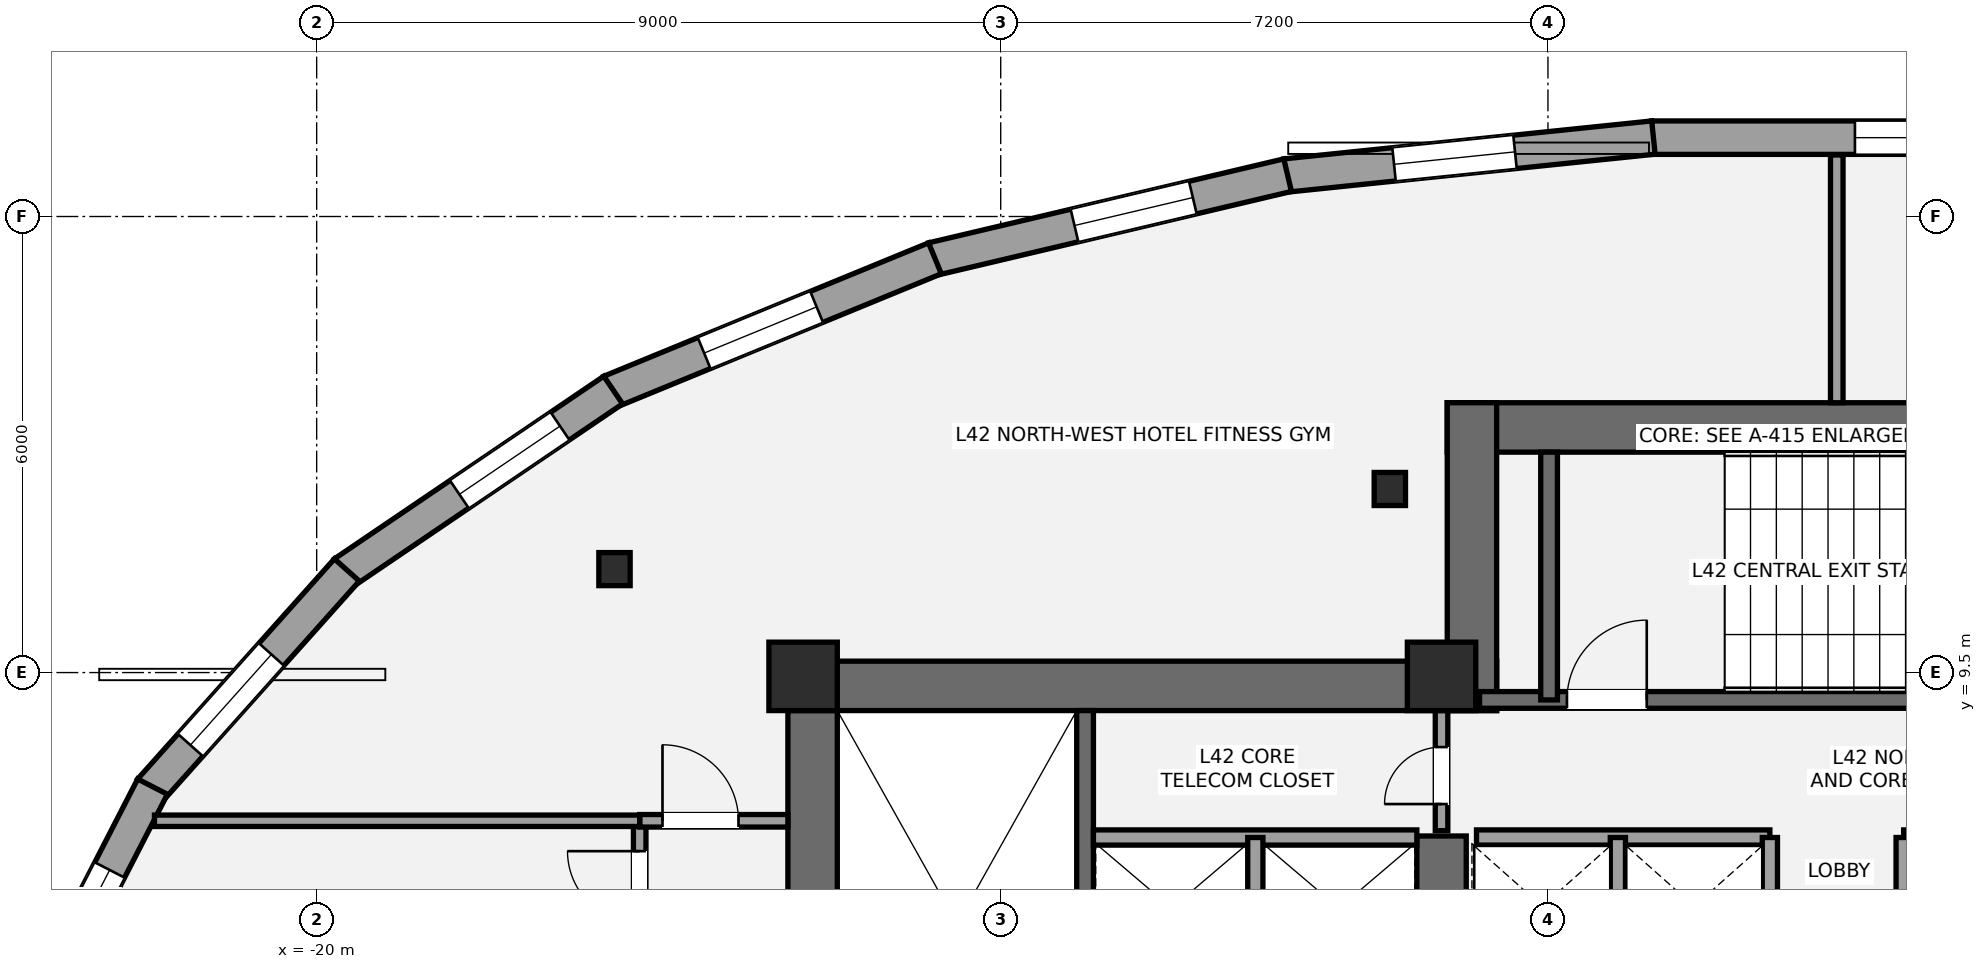
"""IFC4 building model, lengths in metres.
Left out: names, types, materials, properties, quantities, classifications, styles, units other than length and angle.
Written with IfcOpenShell. Run it as: python <this file> out.ifc"""

import sys

from ifc_helpers import new_model, si_unit, direction, frame, frame_2d, origin, origin_2d, place, context, subcontext, project, spatial, rectangle, i_section, extrude, element, fill, save


model = new_model("IFC4")
c1 = context("Model", 3, precision=1e-05, world=origin(), true_north=direction((0.0, 1.0)))
c2 = subcontext(c1, "Body", "Model", "MODEL_VIEW")
j1 = project(units=[si_unit("LENGTHUNIT", "METRE"), si_unit("PLANEANGLEUNIT", "RADIAN")], contexts=[c1])
p1 = place(None, origin())
s1 = spatial("IfcSite", under=j1, at=p1, CompositionType="ELEMENT")
p2 = place(p1, origin())
s2 = spatial("IfcBuilding", under=s1, at=p2, CompositionType="ELEMENT")
p3 = place(p2, frame((0.0, 0.0, 156.6)))
s3 = spatial("IfcBuildingStorey", under=s2, at=p3, CompositionType="ELEMENT", Elevation=156.6)
p4 = place(p3, frame((-13.475, 1.2, 0.0), z_axis=(0.0, 0.0, 1.0), x_axis=(0.0, 1.0, 0.0)))
e1 = element("IfcWall", 1, at=p4, inside=s3, PredefinedType="SHEAR", context=c2, shape_type="SweptSolid", body=[
    extrude(rectangle(XDim=8.45, YDim=0.65, at=frame_2d((4.225, 0.0))), origin(), (0.0, 0.0, 1.0), 3.2),
])
p5 = place(p3, frame((-13.8, 9.325, 0.0), z_axis=(0.0, 0.0, 1.0), x_axis=(1.0, 0.0, 0.0)))
e2 = element("IfcWall", 2, at=p5, inside=s3, PredefinedType="SHEAR", context=c2, shape_type="SweptSolid", body=[
    extrude(rectangle(XDim=9.325, YDim=0.65, at=frame_2d((4.663, 0.0))), origin(), (0.0, 0.0, 1.0), 3.2),
])
p6 = place(p3, frame((-5.2, 5.35, 0.0), z_axis=(0.0, 0.0, 1.0), x_axis=(0.0, 1.0, 0.0)))
e3 = element("IfcWall", 3, at=p6, inside=s3, PredefinedType="SHEAR", context=c2, shape_type="SweptSolid", body=[
    extrude(rectangle(XDim=2.0, YDim=0.65, at=frame_2d((1.0, 0.0))), origin(), (0.0, 0.0, 1.0), 3.2),
])
p7 = place(p3, frame((-9.89, 1.85, 0.0), z_axis=(0.0, 0.0, 1.0), x_axis=(0.0, 1.0, 0.0)))
e4 = element("IfcWall", 4, at=p7, inside=s3, PredefinedType="SHEAR", context=c2, shape_type="SweptSolid", body=[
    extrude(rectangle(XDim=7.15, YDim=0.22, at=frame_2d((3.575, 0.0))), origin(), (0.0, 0.0, 1.0), 3.2),
])
p8 = place(p3, frame((-5.125, 12.725, 0.0), z_axis=(0.0, 0.0, 1.0), x_axis=(1.0, 0.0, 0.0)))
e5 = element("IfcWall", 5, at=p8, inside=s3, PredefinedType="SHEAR", context=c2, shape_type="SweptSolid", body=[
    extrude(rectangle(XDim=10.25, YDim=0.65, at=frame_2d((5.125, 0.0))), origin(), (0.0, 0.0, 1.0), 3.2),
])
p9 = place(p3, frame((-4.8, 9.0, 0.0), z_axis=(0.0, 0.0, 1.0), x_axis=(0.0, 1.0, 0.0)))
e6 = element("IfcWall", 6, at=p9, inside=s3, PredefinedType="SHEAR", context=c2, shape_type="SweptSolid", body=[
    extrude(rectangle(XDim=4.05, YDim=0.65, at=frame_2d((2.025, 0.0))), origin(), (0.0, 0.0, 1.0), 3.2),
])
p10 = place(p3, frame((-4.7, 9.14, 0.0), z_axis=(0.0, 0.0, 1.0), x_axis=(1.0, 0.0, 0.0)))
e7 = element("IfcWall", 7, at=p10, inside=s3, PredefinedType="SHEAR", context=c2, shape_type="SweptSolid", body=[
    extrude(rectangle(XDim=9.3, YDim=0.22, at=frame_2d((4.65, 0.0))), origin(), (0.0, 0.0, 1.0), 3.2),
])
p11 = place(p10, frame((1.15, 0.0, 0.0)))
e8 = element("IfcOpeningElement", 8, at=p11, cuts=e7, PredefinedType="OPENING", context=c2, shape_type="SweptSolid", body=[
    extrude(rectangle(XDim=1.05, YDim=2.15, at=frame_2d((0.525, 1.075))), frame((0.0, 0.12, 0.0), z_axis=(0.0, -1.0, 0.0), x_axis=(1.0, 0.0, 0.0)), (0.0, 0.0, 1.0), 0.24),
])
p12 = place(p3, frame((-3.785, 9.14, 0.0), z_axis=(0.0, 0.0, 1.0), x_axis=(0.0, 1.0, 0.0)))
e9 = element("IfcWall", 9, at=p12, inside=s3, PredefinedType="SHEAR", context=c2, shape_type="SweptSolid", body=[
    extrude(rectangle(XDim=3.26, YDim=0.22, at=frame_2d((1.63, 0.0))), origin(), (0.0, 0.0, 1.0), 3.2),
])
for number, where, z_axis, x_axis in (
    (10, (-13.6, 9.45, 0.0), (0.0, 0.0, 1.0), (1.0, 0.0, 0.0)),
    (11, (-5.2, 9.45, 0.0), (0.0, 0.0, 1.0), (1.0, 0.0, 0.0)),
):
    element("IfcColumn", number, at=place(p3, frame(where, z_axis=z_axis, x_axis=x_axis)), inside=s3, PredefinedType="COLUMN", context=c2, shape_type="SweptSolid", body=[
        extrude(rectangle(XDim=0.9, YDim=0.9, at=origin_2d()), origin(), (0.0, 0.0, 1.0), 3.2),
    ])
for number, where, z_axis, x_axis in (
    (12, (-5.88, 11.915, 0.0), (0.0, 0.0, 1.0), (1.0, 0.0, 0.0)),
    (13, (-16.082, 10.861, 0.0), (0.0, 0.0, 1.0), (1.0, 0.0, 0.0)),
):
    element("IfcColumn", number, at=place(p3, frame(where, z_axis=z_axis, x_axis=x_axis)), inside=s3, PredefinedType="COLUMN", context=c2, shape_type="SweptSolid", body=[
        extrude(i_section(OverallWidth=0.412, OverallDepth=0.435, WebThickness=0.036, FlangeThickness=0.057, at=origin_2d()), origin(), (0.0, 0.0, 1.0), 3.2),
    ])
p13 = place(p3, frame((-2.435, 16.537, 0.0), z_axis=(0.0, 0.0, 1.0), x_axis=(1.0, 0.0, 0.0)))
e14 = element("IfcWall", 14, at=p13, inside=s3, PredefinedType="STANDARD", context=c2, shape_type="SweptSolid", body=[
    extrude(rectangle(XDim=4.87, YDim=0.44, at=frame_2d((2.435, 0.0))), origin(), (0.0, 0.0, 1.0), 2.315),
])
p14 = place(p13, frame((2.674, 0.0, 0.58)))
e15 = element("IfcOpeningElement", 15, at=p14, cuts=e14, PredefinedType="OPENING", context=c2, shape_type="SweptSolid", body=[
    extrude(rectangle(XDim=1.6, YDim=1.55, at=frame_2d((0.8, 0.775))), frame((0.0, 0.23, 0.0), z_axis=(0.0, -1.0, 0.0), x_axis=(1.0, 0.0, 0.0)), (0.0, 0.0, 1.0), 0.46),
])
p15 = place(p3, frame((-7.253, 16.039, 0.0), z_axis=(0.0, 0.0, 1.0), x_axis=(0.994718319881, 0.10264240884, 0.0)))
e16 = element("IfcWall", 16, at=p15, inside=s3, PredefinedType="STANDARD", context=c2, shape_type="SweptSolid", body=[
    extrude(rectangle(XDim=4.866, YDim=0.44, at=frame_2d((2.433, 0.0))), origin(), (0.0, 0.0, 1.0), 2.315),
])
p16 = place(p15, frame((1.436, 0.0, 0.58)))
e17 = element("IfcOpeningElement", 17, at=p16, cuts=e16, PredefinedType="OPENING", context=c2, shape_type="SweptSolid", body=[
    extrude(rectangle(XDim=1.6, YDim=1.55, at=frame_2d((0.8, 0.775))), frame((0.0, 0.23, 0.0), z_axis=(0.0, -1.0, 0.0), x_axis=(1.0, 0.0, 0.0)), (0.0, 0.0, 1.0), 0.46),
])
p17 = place(p3, frame((-11.898, 14.939, 0.0), z_axis=(0.0, 0.0, 1.0), x_axis=(0.973201371538, 0.229954539936, 0.0)))
e18 = element("IfcWall", 18, at=p17, inside=s3, PredefinedType="STANDARD", context=c2, shape_type="SweptSolid", body=[
    extrude(rectangle(XDim=4.802, YDim=0.44, at=frame_2d((2.401, 0.0))), origin(), (0.0, 0.0, 1.0), 2.315),
])
p18 = place(p17, frame((1.921, 0.0, 0.58)))
e19 = element("IfcOpeningElement", 19, at=p18, cuts=e18, PredefinedType="OPENING", context=c2, shape_type="SweptSolid", body=[
    extrude(rectangle(XDim=1.6, YDim=1.55, at=frame_2d((0.8, 0.775))), frame((0.0, 0.23, 0.0), z_axis=(0.0, -1.0, 0.0), x_axis=(1.0, 0.0, 0.0)), (0.0, 0.0, 1.0), 0.46),
])
p19 = place(p3, frame((-16.138, 13.195, 0.0), z_axis=(0.0, 0.0, 1.0), x_axis=(0.925044361302, 0.3798590918, 0.0)))
e20 = element("IfcWall", 20, at=p19, inside=s3, PredefinedType="STANDARD", context=c2, shape_type="SweptSolid", body=[
    extrude(rectangle(XDim=4.619, YDim=0.44, at=frame_2d((2.31, 0.0))), origin(), (0.0, 0.0, 1.0), 2.315),
])
p20 = place(p19, frame((1.337, 0.0, 0.58)))
e21 = element("IfcOpeningElement", 21, at=p20, cuts=e20, PredefinedType="OPENING", context=c2, shape_type="SweptSolid", body=[
    extrude(rectangle(XDim=1.6, YDim=1.55, at=frame_2d((0.8, 0.775))), frame((0.0, 0.23, 0.0), z_axis=(0.0, -1.0, 0.0), x_axis=(1.0, 0.0, 0.0)), (0.0, 0.0, 1.0), 0.46),
])
p21 = place(p3, frame((-19.643, 10.814, 0.0), z_axis=(0.0, 0.0, 1.0), x_axis=(0.827771778383, 0.561064954272, 0.0)))
e22 = element("IfcWall", 22, at=p21, inside=s3, PredefinedType="STANDARD", context=c2, shape_type="SweptSolid", body=[
    extrude(rectangle(XDim=4.282, YDim=0.44, at=frame_2d((2.141, 0.0))), origin(), (0.0, 0.0, 1.0), 2.315),
])
p22 = place(p21, frame((1.837, 0.0, 0.58)))
e23 = element("IfcOpeningElement", 23, at=p22, cuts=e22, PredefinedType="OPENING", context=c2, shape_type="SweptSolid", body=[
    extrude(rectangle(XDim=1.6, YDim=1.55, at=frame_2d((0.8, 0.775))), frame((0.0, 0.23, 0.0), z_axis=(0.0, -1.0, 0.0), x_axis=(1.0, 0.0, 0.0)), (0.0, 0.0, 1.0), 0.46),
])
p23 = place(p3, frame((-22.191, 7.953, 0.0), z_axis=(0.0, 0.0, 1.0), x_axis=(0.666335444554, 0.745652114147, 0.0)))
e24 = element("IfcWall", 24, at=p23, inside=s3, PredefinedType="STANDARD", context=c2, shape_type="SweptSolid", body=[
    extrude(rectangle(XDim=3.885, YDim=0.44, at=frame_2d((1.942, 0.0))), origin(), (0.0, 0.0, 1.0), 2.315),
])
p24 = place(p23, frame((0.795, 0.0, 0.58)))
e25 = element("IfcOpeningElement", 25, at=p24, cuts=e24, PredefinedType="OPENING", context=c2, shape_type="SweptSolid", body=[
    extrude(rectangle(XDim=1.6, YDim=1.55, at=frame_2d((0.8, 0.775))), frame((0.0, 0.23, 0.0), z_axis=(0.0, -1.0, 0.0), x_axis=(1.0, 0.0, 0.0)), (0.0, 0.0, 1.0), 0.46),
])
p25 = place(p3, frame((-23.789, 4.831, 0.0), z_axis=(0.0, 0.0, 1.0), x_axis=(0.457409955052, 0.889255943483, 0.0)))
e26 = element("IfcWall", 26, at=p25, inside=s3, PredefinedType="STANDARD", context=c2, shape_type="SweptSolid", body=[
    extrude(rectangle(XDim=3.562, YDim=0.44, at=frame_2d((1.781, 0.0))), origin(), (0.0, 0.0, 1.0), 2.315),
])
p26 = place(p25, frame((1.429, 0.0, 0.58)))
e27 = element("IfcOpeningElement", 27, at=p26, cuts=e26, PredefinedType="OPENING", context=c2, shape_type="SweptSolid", body=[
    extrude(rectangle(XDim=0.9, YDim=1.35, at=frame_2d((0.45, 0.675))), frame((0.0, 0.23, 0.0), z_axis=(0.0, -1.0, 0.0), x_axis=(1.0, 0.0, 0.0)), (0.0, 0.0, 1.0), 0.46),
])
p27 = place(p3, frame((-9.78, 7.33, 0.0), z_axis=(0.0, 0.0, 1.0), x_axis=(1.0, 0.0, 0.0)))
e28 = element("IfcWall", 28, at=p27, inside=s3, PredefinedType="SOLIDWALL", context=c2, shape_type="SweptSolid", body=[
    extrude(rectangle(XDim=4.255, YDim=0.2, at=frame_2d((2.127, 0.0))), origin(), (0.0, 0.0, 1.0), 3.02),
])
p28 = place(p3, frame((-7.65, 5.47, 0.0), z_axis=(0.0, 0.0, 1.0), x_axis=(0.0, 1.0, 0.0)))
e29 = element("IfcWall", 29, at=p28, inside=s3, PredefinedType="SOLIDWALL", context=c2, shape_type="SweptSolid", body=[
    extrude(rectangle(XDim=1.86, YDim=0.2, at=frame_2d((0.93, 0.0))), origin(), (0.0, 0.0, 1.0), 3.02),
])
for number, where, z_axis, x_axis in (
    (30, (-4.74, 7.33, 0.0), (0.0, 0.0, 1.0), (1.0, 0.0, 0.0)),
    (31, (0.88, 7.33, 0.0), (0.0, 0.0, 1.0), (1.0, 0.0, 0.0)),
):
    element("IfcWall", number, at=place(p3, frame(where, z_axis=z_axis, x_axis=x_axis)), inside=s3, PredefinedType="SOLIDWALL", context=c2, shape_type="SweptSolid", body=[
        extrude(rectangle(XDim=3.86, YDim=0.2, at=frame_2d((1.93, 0.0))), origin(), (0.0, 0.0, 1.0), 3.02),
    ])
for number, where, z_axis, x_axis in (
    (32, (-2.88, 5.52, 0.0), (0.0, 0.0, 1.0), (0.0, 1.0, 0.0)),
    (33, (-0.88, 5.52, 0.0), (0.0, 0.0, 1.0), (0.0, 1.0, 0.0)),
    (34, (0.88, 5.52, 0.0), (0.0, 0.0, 1.0), (0.0, 1.0, 0.0)),
):
    element("IfcWall", number, at=place(p3, frame(where, z_axis=z_axis, x_axis=x_axis)), inside=s3, PredefinedType="SOLIDWALL", context=c2, shape_type="SweptSolid", body=[
        extrude(rectangle(XDim=1.81, YDim=0.2, at=frame_2d((0.905, 0.0))), origin(), (0.0, 0.0, 1.0), 3.02),
    ])
p29 = place(p3, frame((-5.2, 7.42, 0.0), z_axis=(0.0, 0.0, 1.0), x_axis=(0.0, 1.0, 0.0)))
e35 = element("IfcWall", 35, at=p29, inside=s3, PredefinedType="PARTITIONING", context=c2, shape_type="SweptSolid", body=[
    extrude(rectangle(XDim=1.58, YDim=0.165, at=frame_2d((0.79, 0.0))), origin(), (0.0, 0.0, 1.0), 3.02),
])
p30 = place(p29, frame((0.35, 0.0, 0.0)))
e36 = element("IfcOpeningElement", 36, at=p30, cuts=e35, PredefinedType="OPENING", context=c2, shape_type="SweptSolid", body=[
    extrude(rectangle(XDim=0.75, YDim=2.1, at=frame_2d((0.375, 1.05))), frame((0.0, 0.093, 0.0), z_axis=(0.0, -1.0, 0.0), x_axis=(1.0, 0.0, 0.0)), (0.0, 0.0, 1.0), 0.185),
])
p31 = place(p3, frame((-15.75, -13.108, 0.0), z_axis=(0.0, 0.0, 1.0), x_axis=(0.0, 1.0, 0.0)))
e37 = element("IfcWall", 37, at=p31, inside=s3, PredefinedType="PARTITIONING", context=c2, shape_type="SweptSolid", body=[
    extrude(rectangle(XDim=20.658, YDim=0.165, at=frame_2d((10.329, 0.0))), origin(), (0.0, 0.0, 1.0), 2.473),
])
p32 = place(p31, frame((5.559, 0.0, 0.0)))
e38 = element("IfcOpeningElement", 38, at=p32, cuts=e37, PredefinedType="OPENING", context=c2, shape_type="SweptSolid", body=[
    extrude(rectangle(XDim=0.85, YDim=2.1, at=frame_2d((0.425, 1.05))), frame((0.0, 0.093, 0.0), z_axis=(0.0, -1.0, 0.0), x_axis=(1.0, 0.0, 0.0)), (0.0, 0.0, 1.0), 0.185),
])
p33 = place(p31, frame((9.959, 0.0, 0.0)))
e39 = element("IfcOpeningElement", 39, at=p33, cuts=e37, PredefinedType="OPENING", context=c2, shape_type="SweptSolid", body=[
    extrude(rectangle(XDim=0.95, YDim=2.15, at=frame_2d((0.475, 1.075))), frame((0.0, 0.093, 0.0), z_axis=(0.0, -1.0, 0.0), x_axis=(1.0, 0.0, 0.0)), (0.0, 0.0, 1.0), 0.185),
])
p34 = place(p31, frame((14.559, 0.0, 0.0)))
e40 = element("IfcOpeningElement", 40, at=p34, cuts=e37, PredefinedType="OPENING", context=c2, shape_type="SweptSolid", body=[
    extrude(rectangle(XDim=0.95, YDim=2.15, at=frame_2d((0.475, 1.075))), frame((0.0, 0.093, 0.0), z_axis=(0.0, -1.0, 0.0), x_axis=(1.0, 0.0, 0.0)), (0.0, 0.0, 1.0), 0.185),
])
p35 = place(p31, frame((19.309, 0.0, 0.0)))
e41 = element("IfcOpeningElement", 41, at=p35, cuts=e37, PredefinedType="OPENING", context=c2, shape_type="SweptSolid", body=[
    extrude(rectangle(XDim=0.95, YDim=2.15, at=frame_2d((0.475, 1.075))), frame((0.0, 0.093, 0.0), z_axis=(0.0, -1.0, 0.0), x_axis=(1.0, 0.0, 0.0)), (0.0, 0.0, 1.0), 0.185),
])
p36 = place(p3, frame((-15.75, 7.55, 0.0), z_axis=(0.0, 0.0, 1.0), x_axis=(1.0, 0.0, 0.0)))
e42 = element("IfcWall", 42, at=p36, inside=s3, PredefinedType="PARTITIONING", context=c2, shape_type="SweptSolid", body=[
    extrude(rectangle(XDim=1.95, YDim=0.165, at=frame_2d((0.975, 0.0))), origin(), (0.0, 0.0, 1.0), 3.02),
])
p37 = place(p36, frame((0.3, 0.0, 0.0)))
e43 = element("IfcOpeningElement", 43, at=p37, cuts=e42, PredefinedType="OPENING", context=c2, shape_type="SweptSolid", body=[
    extrude(rectangle(XDim=1.0, YDim=2.15, at=frame_2d((0.5, 1.075))), frame((0.0, 0.093, 0.0), z_axis=(0.0, -1.0, 0.0), x_axis=(1.0, 0.0, 0.0)), (0.0, 0.0, 1.0), 0.185),
])
p38 = place(p3, frame((-22.134, 7.55, 0.0), z_axis=(0.0, 0.0, 1.0), x_axis=(1.0, 0.0, 0.0)))
e44 = element("IfcWall", 44, at=p38, inside=s3, PredefinedType="PLUMBINGWALL", context=c2, shape_type="SweptSolid", body=[
    extrude(rectangle(XDim=6.384, YDim=0.15, at=frame_2d((3.192, 0.0))), origin(), (0.0, 0.0, 1.0), 2.473),
])
p39 = place(p3, frame((0.0, 13.05, 0.0), z_axis=(0.0, 0.0, 1.0), x_axis=(0.0, 1.0, 0.0)))
e45 = element("IfcWall", 45, at=p39, inside=s3, PredefinedType="PARTITIONING", context=c2, shape_type="SweptSolid", body=[
    extrude(rectangle(XDim=3.259, YDim=0.165, at=frame_2d((1.63, 0.0))), origin(), (0.0, 0.0, 1.0), 3.02),
])
p40 = place(p14, origin())
e46 = element("IfcWindow", 46, at=p40, inside=s3, PartitioningType="SINGLE_PANEL", PredefinedType="WINDOW", context=c2, shape_type="SweptSolid", body=[
    extrude(rectangle(XDim=1.6, YDim=1.55, at=frame_2d((0.8, 0.775))), frame((0.0, -0.01, 0.0), z_axis=(0.0, -1.0, 0.0), x_axis=(1.0, 0.0, 0.0)), (0.0, 0.0, 1.0), 0.06),
])
fill(e15, e46)
p41 = place(p16, origin())
e47 = element("IfcWindow", 47, at=p41, inside=s3, PartitioningType="SINGLE_PANEL", PredefinedType="WINDOW", context=c2, shape_type="SweptSolid", body=[
    extrude(rectangle(XDim=1.6, YDim=1.55, at=frame_2d((0.8, 0.775))), frame((0.0, -0.01, 0.0), z_axis=(0.0, -1.0, 0.0), x_axis=(1.0, 0.0, 0.0)), (0.0, 0.0, 1.0), 0.06),
])
fill(e17, e47)
p42 = place(p18, origin())
e48 = element("IfcWindow", 48, at=p42, inside=s3, PartitioningType="SINGLE_PANEL", PredefinedType="WINDOW", context=c2, shape_type="SweptSolid", body=[
    extrude(rectangle(XDim=1.6, YDim=1.55, at=frame_2d((0.8, 0.775))), frame((0.0, -0.01, 0.0), z_axis=(0.0, -1.0, 0.0), x_axis=(1.0, 0.0, 0.0)), (0.0, 0.0, 1.0), 0.06),
])
fill(e19, e48)
p43 = place(p20, origin())
e49 = element("IfcWindow", 49, at=p43, inside=s3, PartitioningType="SINGLE_PANEL", PredefinedType="WINDOW", context=c2, shape_type="SweptSolid", body=[
    extrude(rectangle(XDim=1.6, YDim=1.55, at=frame_2d((0.8, 0.775))), frame((0.0, -0.01, 0.0), z_axis=(0.0, -1.0, 0.0), x_axis=(1.0, 0.0, 0.0)), (0.0, 0.0, 1.0), 0.06),
])
fill(e21, e49)
p44 = place(p22, origin())
e50 = element("IfcWindow", 50, at=p44, inside=s3, PartitioningType="SINGLE_PANEL", PredefinedType="WINDOW", context=c2, shape_type="SweptSolid", body=[
    extrude(rectangle(XDim=1.6, YDim=1.55, at=frame_2d((0.8, 0.775))), frame((0.0, -0.01, 0.0), z_axis=(0.0, -1.0, 0.0), x_axis=(1.0, 0.0, 0.0)), (0.0, 0.0, 1.0), 0.06),
])
fill(e23, e50)
p45 = place(p24, origin())
e51 = element("IfcWindow", 51, at=p45, inside=s3, PartitioningType="SINGLE_PANEL", PredefinedType="WINDOW", context=c2, shape_type="SweptSolid", body=[
    extrude(rectangle(XDim=1.6, YDim=1.55, at=frame_2d((0.8, 0.775))), frame((0.0, -0.01, 0.0), z_axis=(0.0, -1.0, 0.0), x_axis=(1.0, 0.0, 0.0)), (0.0, 0.0, 1.0), 0.06),
])
fill(e25, e51)
p46 = place(p26, origin())
e52 = element("IfcWindow", 52, at=p46, inside=s3, PartitioningType="SINGLE_PANEL", PredefinedType="WINDOW", context=c2, shape_type="SweptSolid", body=[
    extrude(rectangle(XDim=0.9, YDim=1.35, at=frame_2d((0.45, 0.675))), frame((0.0, -0.01, 0.0), z_axis=(0.0, -1.0, 0.0), x_axis=(1.0, 0.0, 0.0)), (0.0, 0.0, 1.0), 0.06),
])
fill(e27, e52)
p47 = place(p11, origin())
e53 = element("IfcDoor", 53, at=p47, inside=s3, OperationType="SINGLE_SWING_RIGHT", PredefinedType="DOOR", context=c2, shape_type="SweptSolid", body=[
    extrude(rectangle(XDim=1.05, YDim=2.15, at=frame_2d((0.525, 1.075))), frame((0.0, 0.025, 0.0), z_axis=(0.0, -1.0, 0.0), x_axis=(1.0, 0.0, 0.0)), (0.0, 0.0, 1.0), 0.05),
])
fill(e8, e53)
p48 = place(p30, origin())
e54 = element("IfcDoor", 54, at=p48, inside=s3, OperationType="SINGLE_SWING_LEFT", PredefinedType="DOOR", context=c2, shape_type="SweptSolid", body=[
    extrude(rectangle(XDim=0.75, YDim=2.1, at=frame_2d((0.375, 1.05))), frame((0.0, 0.025, 0.0), z_axis=(0.0, -1.0, 0.0), x_axis=(1.0, 0.0, 0.0)), (0.0, 0.0, 1.0), 0.05),
])
fill(e36, e54)
p49 = place(p37, origin())
e55 = element("IfcDoor", 55, at=p49, inside=s3, OperationType="SINGLE_SWING_LEFT", PredefinedType="DOOR", context=c2, shape_type="SweptSolid", body=[
    extrude(rectangle(XDim=1.0, YDim=2.15, at=frame_2d((0.5, 1.075))), frame((0.0, 0.025, 0.0), z_axis=(0.0, -1.0, 0.0), x_axis=(1.0, 0.0, 0.0)), (0.0, 0.0, 1.0), 0.05),
])
fill(e43, e55)
p50 = place(p35, origin())
e56 = element("IfcDoor", 56, at=p50, inside=s3, OperationType="SINGLE_SWING_RIGHT", PredefinedType="DOOR", context=c2, shape_type="SweptSolid", body=[
    extrude(rectangle(XDim=0.95, YDim=2.15, at=frame_2d((0.475, 1.075))), frame((0.0, 0.025, 0.0), z_axis=(0.0, -1.0, 0.0), x_axis=(1.0, 0.0, 0.0)), (0.0, 0.0, 1.0), 0.05),
])
fill(e41, e56)
save(model, sys.argv[1])
